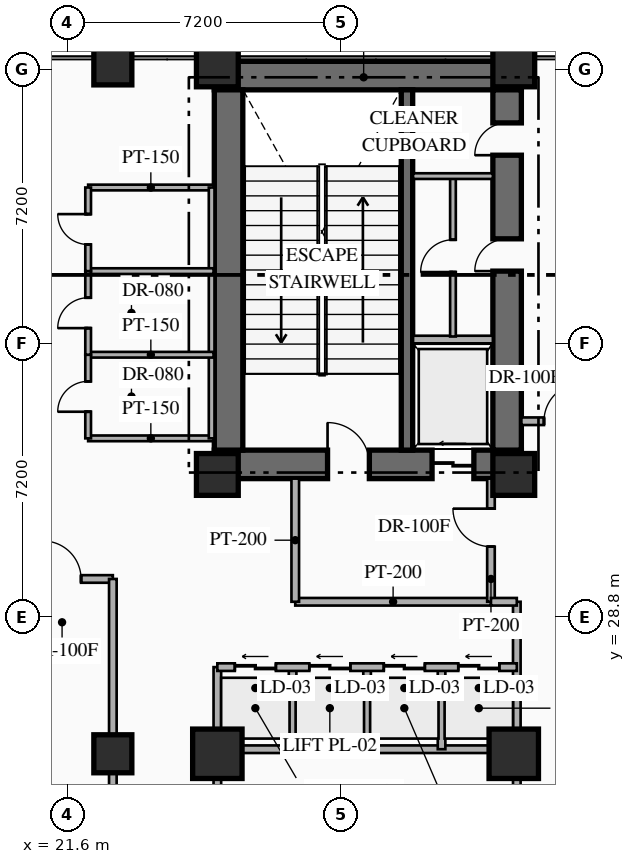
"""IFC4 building model, lengths in metres.
Left out: names, types, materials, properties, quantities, classifications, styles, units other than length and angle.
Written with IfcOpenShell. Run it as: python <this file> out.ifc"""

import sys

from ifc_helpers import new_model, si_unit, direction, frame, frame_2d, origin, origin_2d, place, context, subcontext, project, spatial, rectangle, hollow_rectangle, extrude, element, fill, save


model = new_model("IFC4")
c1 = context("Model", 3, precision=1e-05, world=origin(), true_north=direction((0.0, 1.0)))
c2 = subcontext(c1, "Body", "Model", "MODEL_VIEW")
j1 = project(units=[si_unit("LENGTHUNIT", "METRE"), si_unit("PLANEANGLEUNIT", "RADIAN")], contexts=[c1])
p1 = place(None, origin())
s1 = spatial("IfcSite", under=j1, at=p1, CompositionType="ELEMENT")
p2 = place(p1, origin())
s2 = spatial("IfcBuilding", under=s1, at=p2, CompositionType="ELEMENT")
p3 = place(p2, origin())
s3 = spatial("IfcBuildingStorey", under=s2, at=p3, CompositionType="ELEMENT", Elevation=0.0)
p4 = place(p3, frame((25.47, 32.815, 0.0), z_axis=(0.0, 0.0, 1.0), x_axis=(1.0, 0.0, 0.0)))
e1 = element("IfcWall", 1, at=p4, inside=s3, PredefinedType="SHEAR", context=c2, shape_type="SweptSolid", body=[
    extrude(rectangle(XDim=8.08, YDim=0.75, at=frame_2d((4.04, 0.0))), origin(), (0.0, 0.0, 1.0), 5.4),
])
p5 = place(p4, frame((2.98, 0.0, 0.0)))
e2 = element("IfcOpeningElement", 2, at=p5, cuts=e1, PredefinedType="OPENING", context=c2, shape_type="SweptSolid", body=[
    extrude(rectangle(XDim=1.1, YDim=2.2, at=frame_2d((0.55, 1.1))), frame((0.0, 0.385, 0.0), z_axis=(0.0, -1.0, 0.0), x_axis=(1.0, 0.0, 0.0)), (0.0, 0.0, 1.0), 0.77),
])
p6 = place(p4, frame((5.73, 0.0, 0.0)))
e3 = element("IfcOpeningElement", 3, at=p6, cuts=e1, PredefinedType="OPENING", context=c2, shape_type="SweptSolid", body=[
    extrude(rectangle(XDim=1.1, YDim=2.15, at=frame_2d((0.55, 1.075))), frame((0.0, 0.385, 0.0), z_axis=(0.0, -1.0, 0.0), x_axis=(1.0, 0.0, 0.0)), (0.0, 0.0, 1.0), 0.77),
])
p7 = place(p3, frame((25.47, 43.045, 0.0), z_axis=(0.0, 0.0, 1.0), x_axis=(1.0, 0.0, 0.0)))
e4 = element("IfcWall", 4, at=p7, inside=s3, PredefinedType="SHEAR", context=c2, shape_type="SweptSolid", body=[
    extrude(rectangle(XDim=8.08, YDim=0.75, at=frame_2d((4.04, 0.0))), origin(), (0.0, 0.0, 1.0), 5.4),
])
p8 = place(p3, frame((25.845, 33.19, 0.0), z_axis=(0.0, 0.0, 1.0), x_axis=(0.0, 1.0, 0.0)))
e5 = element("IfcWall", 5, at=p8, inside=s3, PredefinedType="SHEAR", context=c2, shape_type="SweptSolid", body=[
    extrude(rectangle(XDim=9.48, YDim=0.75, at=frame_2d((4.74, 0.0))), origin(), (0.0, 0.0, 1.0), 5.4),
])
p9 = place(p3, frame((33.175, 33.19, 0.0), z_axis=(0.0, 0.0, 1.0), x_axis=(0.0, 1.0, 0.0)))
e6 = element("IfcWall", 6, at=p9, inside=s3, PredefinedType="SHEAR", context=c2, shape_type="SweptSolid", body=[
    extrude(rectangle(XDim=9.48, YDim=0.75, at=frame_2d((4.74, 0.0))), origin(), (0.0, 0.0, 1.0), 5.4),
])
p10 = place(p9, frame((4.71, 0.0, 0.0)))
e7 = element("IfcOpeningElement", 7, at=p10, cuts=e6, PredefinedType="OPENING", context=c2, shape_type="SweptSolid", body=[
    extrude(rectangle(XDim=0.85, YDim=2.08, at=frame_2d((0.425, 1.04))), frame((0.0, 0.385, 0.0), z_axis=(0.0, -1.0, 0.0), x_axis=(1.0, 0.0, 0.0)), (0.0, 0.0, 1.0), 0.77),
])
p11 = place(p9, frame((7.76, 0.0, 0.0)))
e8 = element("IfcOpeningElement", 8, at=p11, cuts=e6, PredefinedType="OPENING", context=c2, shape_type="SweptSolid", body=[
    extrude(rectangle(XDim=0.85, YDim=2.08, at=frame_2d((0.425, 1.04))), frame((0.0, 0.385, 0.0), z_axis=(0.0, -1.0, 0.0), x_axis=(1.0, 0.0, 0.0)), (0.0, 0.0, 1.0), 0.77),
])
p12 = place(p3, frame((30.54, 33.19, 0.0), z_axis=(0.0, 0.0, 1.0), x_axis=(0.0, 1.0, 0.0)))
e9 = element("IfcWall", 9, at=p12, inside=s3, PredefinedType="SHEAR", context=c2, shape_type="SweptSolid", body=[
    extrude(rectangle(XDim=9.48, YDim=0.3, at=frame_2d((4.74, 0.0))), origin(), (0.0, 0.0, 1.0), 5.4),
])
for number, where, z_axis, x_axis in (
    (10, (25.55, 32.55, 0.0), (0.0, 0.0, 1.0), (1.0, 0.0, 0.0)),
    (11, (33.35, 32.55, 0.0), (0.0, 0.0, 1.0), (1.0, 0.0, 0.0)),
    (12, (25.55, 43.3, 0.0), (0.0, 0.0, 1.0), (1.0, 0.0, 0.0)),
    (13, (33.35, 43.3, 0.0), (0.0, 0.0, 1.0), (1.0, 0.0, 0.0)),
):
    element("IfcColumn", number, at=place(p3, frame(where, z_axis=z_axis, x_axis=x_axis)), inside=s3, PredefinedType="COLUMN", context=c2, shape_type="SweptSolid", body=[
        extrude(rectangle(XDim=1.1, YDim=1.1, at=origin_2d()), origin(), (0.0, 0.0, 1.0), 5.4),
    ])
for number, where, z_axis, x_axis in (
    (14, (25.55, 25.2, 0.0), (0.0, 0.0, 1.0), (1.0, 0.0, 0.0)),
    (15, (33.35, 25.2, 0.0), (0.0, 0.0, 1.0), (1.0, 0.0, 0.0)),
):
    element("IfcColumn", number, at=place(p3, frame(where, z_axis=z_axis, x_axis=x_axis)), inside=s3, PredefinedType="COLUMN", context=c2, shape_type="SweptSolid", body=[
        extrude(rectangle(XDim=1.3, YDim=1.3, at=origin_2d()), origin(), (0.0, 0.0, 1.0), 5.4),
    ])
for number, where, z_axis, x_axis in (
    (16, (22.8, 25.2, 0.0), (0.0, 0.0, 1.0), (1.0, 0.0, 0.0)),
    (17, (22.8, 43.3, 0.0), (0.0, 0.0, 1.0), (1.0, 0.0, 0.0)),
):
    element("IfcColumn", number, at=place(p3, frame(where, z_axis=z_axis, x_axis=x_axis)), inside=s3, PredefinedType="COLUMN", context=c2, shape_type="SweptSolid", body=[
        extrude(hollow_rectangle(XDim=1.0, YDim=1.0, WallThickness=0.038, at=origin_2d()), origin(), (0.0, 0.0, 1.0), 5.4),
    ])
p13 = place(p3, frame((30.7, 36.1, 0.0), z_axis=(0.0, 0.0, 1.0), x_axis=(1.0, 0.0, 0.0)))
e18 = element("IfcWall", 18, at=p13, inside=s3, PredefinedType="STANDARD", context=c2, shape_type="SweptSolid", body=[
    extrude(rectangle(XDim=2.1, YDim=0.2, at=frame_2d((1.05, 0.0))), origin(), (0.0, 0.0, 1.0), 5.1),
])
p14 = place(p3, frame((31.75, 36.18, 0.0), z_axis=(0.0, 0.0, 1.0), x_axis=(0.0, 1.0, 0.0)))
e19 = element("IfcWall", 19, at=p14, inside=s3, PredefinedType="PARTITIONING", context=c2, shape_type="SweptSolid", body=[
    extrude(rectangle(XDim=4.24, YDim=0.15, at=frame_2d((2.12, 0.0))), origin(), (0.0, 0.0, 1.0), 5.1),
])
p15 = place(p14, frame((1.695, 0.0, 0.0)))
e20 = element("IfcOpeningElement", 20, at=p15, cuts=e19, PredefinedType="OPENING", context=c2, shape_type="SweptSolid", body=[
    extrude(rectangle(XDim=0.85, YDim=2.08, at=frame_2d((0.425, 1.04))), frame((0.0, 0.085, 0.0), z_axis=(0.0, -1.0, 0.0), x_axis=(1.0, 0.0, 0.0)), (0.0, 0.0, 1.0), 0.17),
])
p16 = place(p3, frame((30.7, 40.4, 0.0), z_axis=(0.0, 0.0, 1.0), x_axis=(1.0, 0.0, 0.0)))
e21 = element("IfcWall", 21, at=p16, inside=s3, PredefinedType="PARTITIONING", context=c2, shape_type="SweptSolid", body=[
    extrude(rectangle(XDim=2.1, YDim=0.15, at=frame_2d((1.05, 0.0))), origin(), (0.0, 0.0, 1.0), 5.1),
])
p17 = place(p3, frame((27.6, 29.2, 0.0), z_axis=(0.0, 0.0, 1.0), x_axis=(1.0, 0.0, 0.0)))
e22 = element("IfcWall", 22, at=p17, inside=s3, PredefinedType="STANDARD", context=c2, shape_type="SweptSolid", body=[
    extrude(rectangle(XDim=5.15, YDim=0.2, at=frame_2d((2.575, 0.0))), origin(), (0.0, 0.0, 1.0), 5.1),
])
p18 = place(p3, frame((27.6, 29.2, 0.0), z_axis=(0.0, 0.0, 1.0), x_axis=(0.0, 1.0, 0.0)))
e23 = element("IfcWall", 23, at=p18, inside=s3, PredefinedType="STANDARD", context=c2, shape_type="SweptSolid", body=[
    extrude(rectangle(XDim=3.24, YDim=0.2, at=frame_2d((1.62, 0.0))), origin(), (0.0, 0.0, 1.0), 5.1),
])
p19 = place(p3, frame((32.75, 29.2, 0.0), z_axis=(0.0, 0.0, 1.0), x_axis=(0.0, 1.0, 0.0)))
e24 = element("IfcWall", 24, at=p19, inside=s3, PredefinedType="STANDARD", context=c2, shape_type="SweptSolid", body=[
    extrude(rectangle(XDim=3.24, YDim=0.2, at=frame_2d((1.62, 0.0))), origin(), (0.0, 0.0, 1.0), 5.1),
])
p20 = place(p19, frame((1.45, 0.0, 0.0)))
e25 = element("IfcOpeningElement", 25, at=p20, cuts=e24, PredefinedType="OPENING", context=c2, shape_type="SweptSolid", body=[
    extrude(rectangle(XDim=1.0, YDim=2.2, at=frame_2d((0.5, 1.1))), frame((0.0, 0.11, 0.0), z_axis=(0.0, -1.0, 0.0), x_axis=(1.0, 0.0, 0.0)), (0.0, 0.0, 1.0), 0.22),
])
p21 = place(p3, frame((25.55, 23.4, 0.0), z_axis=(0.0, 0.0, 1.0), x_axis=(0.0, 1.0, 0.0)))
e26 = element("IfcWall", 26, at=p21, inside=s3, PredefinedType="STANDARD", context=c2, shape_type="SweptSolid", body=[
    extrude(rectangle(XDim=4.08, YDim=0.2, at=frame_2d((2.04, 0.0))), origin(), (0.0, 0.0, 1.0), 3.895),
])
p22 = place(p3, frame((33.43, 23.4, 0.0), z_axis=(0.0, 0.0, 1.0), x_axis=(0.0, 1.0, 0.0)))
e27 = element("IfcWall", 27, at=p22, inside=s3, PredefinedType="STANDARD", context=c2, shape_type="SweptSolid", body=[
    extrude(rectangle(XDim=5.8, YDim=0.2, at=frame_2d((2.9, 0.0))), origin(), (0.0, 0.0, 1.0), 3.895),
])
p23 = place(p3, frame((25.55, 25.32, 0.0), z_axis=(0.0, 0.0, 1.0), x_axis=(1.0, 0.0, 0.0)))
e28 = element("IfcWall", 28, at=p23, inside=s3, PredefinedType="STANDARD", context=c2, shape_type="SweptSolid", body=[
    extrude(rectangle(XDim=7.88, YDim=0.2, at=frame_2d((3.94, 0.0))), origin(), (0.0, 0.0, 1.0), 4.495),
])
for number, where, z_axis, x_axis in (
    (29, (27.53, 25.32, 0.0), (0.0, 0.0, 1.0), (0.0, 1.0, 0.0)),
    (30, (29.49, 25.32, 0.0), (0.0, 0.0, 1.0), (0.0, 1.0, 0.0)),
    (31, (31.45, 25.32, 0.0), (0.0, 0.0, 1.0), (0.0, 1.0, 0.0)),
):
    element("IfcWall", number, at=place(p3, frame(where, z_axis=z_axis, x_axis=x_axis)), inside=s3, PredefinedType="STANDARD", context=c2, shape_type="SweptSolid", body=[
        extrude(rectangle(XDim=2.16, YDim=0.2, at=frame_2d((1.08, 0.0))), origin(), (0.0, 0.0, 1.0), 5.1),
    ])
p24 = place(p3, frame((25.55, 27.48, 0.0), z_axis=(0.0, 0.0, 1.0), x_axis=(1.0, 0.0, 0.0)))
e32 = element("IfcWall", 32, at=p24, inside=s3, PredefinedType="STANDARD", context=c2, shape_type="SweptSolid", body=[
    extrude(rectangle(XDim=7.88, YDim=0.2, at=frame_2d((3.94, 0.0))), origin(), (0.0, 0.0, 1.0), 5.1),
])
p25 = place(p24, frame((0.46, 0.0, 0.0)))
e33 = element("IfcOpeningElement", 33, at=p25, cuts=e32, PredefinedType="OPENING", context=c2, shape_type="SweptSolid", body=[
    extrude(rectangle(XDim=1.08, YDim=2.15, at=frame_2d((0.54, 1.075))), frame((0.0, 0.11, 0.0), z_axis=(0.0, -1.0, 0.0), x_axis=(1.0, 0.0, 0.0)), (0.0, 0.0, 1.0), 0.22),
])
p26 = place(p24, frame((2.42, 0.0, 0.0)))
e34 = element("IfcOpeningElement", 34, at=p26, cuts=e32, PredefinedType="OPENING", context=c2, shape_type="SweptSolid", body=[
    extrude(rectangle(XDim=1.08, YDim=2.15, at=frame_2d((0.54, 1.075))), frame((0.0, 0.11, 0.0), z_axis=(0.0, -1.0, 0.0), x_axis=(1.0, 0.0, 0.0)), (0.0, 0.0, 1.0), 0.22),
])
p27 = place(p24, frame((4.38, 0.0, 0.0)))
e35 = element("IfcOpeningElement", 35, at=p27, cuts=e32, PredefinedType="OPENING", context=c2, shape_type="SweptSolid", body=[
    extrude(rectangle(XDim=1.08, YDim=2.15, at=frame_2d((0.54, 1.075))), frame((0.0, 0.11, 0.0), z_axis=(0.0, -1.0, 0.0), x_axis=(1.0, 0.0, 0.0)), (0.0, 0.0, 1.0), 0.22),
])
p28 = place(p24, frame((6.34, 0.0, 0.0)))
e36 = element("IfcOpeningElement", 36, at=p28, cuts=e32, PredefinedType="OPENING", context=c2, shape_type="SweptSolid", body=[
    extrude(rectangle(XDim=1.08, YDim=2.15, at=frame_2d((0.54, 1.075))), frame((0.0, 0.11, 0.0), z_axis=(0.0, -1.0, 0.0), x_axis=(1.0, 0.0, 0.0)), (0.0, 0.0, 1.0), 0.22),
])
for number, where, z_axis, x_axis in (
    (37, (22.15, 33.5, 0.0), (0.0, 0.0, 1.0), (1.0, 0.0, 0.0)),
    (38, (22.15, 40.1, 0.0), (0.0, 0.0, 1.0), (1.0, 0.0, 0.0)),
):
    element("IfcWall", number, at=place(p3, frame(where, z_axis=z_axis, x_axis=x_axis)), inside=s3, PredefinedType="PARTITIONING", context=c2, shape_type="SweptSolid", body=[
        extrude(rectangle(XDim=3.3, YDim=0.15, at=frame_2d((1.65, 0.0))), origin(), (0.0, 0.0, 1.0), 5.1),
    ])
p29 = place(p3, frame((25.4, 33.5, 0.0), z_axis=(0.0, 0.0, 1.0), x_axis=(0.0, 1.0, 0.0)))
e39 = element("IfcWall", 39, at=p29, inside=s3, PredefinedType="PARTITIONING", context=c2, shape_type="SweptSolid", body=[
    extrude(rectangle(XDim=6.6, YDim=0.15, at=frame_2d((3.3, 0.0))), origin(), (0.0, 0.0, 1.0), 5.1),
])
for number, where, z_axis, x_axis in (
    (40, (22.15, 35.7, 0.0), (0.0, 0.0, 1.0), (1.0, 0.0, 0.0)),
    (41, (22.15, 37.9, 0.0), (0.0, 0.0, 1.0), (1.0, 0.0, 0.0)),
):
    element("IfcWall", number, at=place(p3, frame(where, z_axis=z_axis, x_axis=x_axis)), inside=s3, PredefinedType="PARTITIONING", context=c2, shape_type="SweptSolid", body=[
        extrude(rectangle(XDim=3.3, YDim=0.15, at=frame_2d((1.65, 0.0))), origin(), (0.0, 0.0, 1.0), 5.1),
    ])
p30 = place(p3, frame((22.15, 33.5, 0.0), z_axis=(0.0, 0.0, 1.0), x_axis=(0.0, 1.0, 0.0)))
e42 = element("IfcWall", 42, at=p30, inside=s3, PredefinedType="PARTITIONING", context=c2, shape_type="SweptSolid", body=[
    extrude(rectangle(XDim=2.2, YDim=0.15, at=frame_2d((1.1, 0.0))), origin(), (0.0, 0.0, 1.0), 5.1),
])
p31 = place(p30, frame((0.7, 0.0, 0.0)))
e43 = element("IfcOpeningElement", 43, at=p31, cuts=e42, PredefinedType="OPENING", context=c2, shape_type="SweptSolid", body=[
    extrude(rectangle(XDim=0.8, YDim=2.06, at=frame_2d((0.4, 1.03))), frame((0.0, 0.085, 0.0), z_axis=(0.0, -1.0, 0.0), x_axis=(1.0, 0.0, 0.0)), (0.0, 0.0, 1.0), 0.17),
])
p32 = place(p3, frame((22.15, 35.7, 0.0), z_axis=(0.0, 0.0, 1.0), x_axis=(0.0, 1.0, 0.0)))
e44 = element("IfcWall", 44, at=p32, inside=s3, PredefinedType="PARTITIONING", context=c2, shape_type="SweptSolid", body=[
    extrude(rectangle(XDim=2.2, YDim=0.15, at=frame_2d((1.1, 0.0))), origin(), (0.0, 0.0, 1.0), 5.1),
])
p33 = place(p32, frame((0.7, 0.0, 0.0)))
e45 = element("IfcOpeningElement", 45, at=p33, cuts=e44, PredefinedType="OPENING", context=c2, shape_type="SweptSolid", body=[
    extrude(rectangle(XDim=0.8, YDim=2.06, at=frame_2d((0.4, 1.03))), frame((0.0, 0.085, 0.0), z_axis=(0.0, -1.0, 0.0), x_axis=(1.0, 0.0, 0.0)), (0.0, 0.0, 1.0), 0.17),
])
p34 = place(p3, frame((22.15, 37.9, 0.0), z_axis=(0.0, 0.0, 1.0), x_axis=(0.0, 1.0, 0.0)))
e46 = element("IfcWall", 46, at=p34, inside=s3, PredefinedType="PARTITIONING", context=c2, shape_type="SweptSolid", body=[
    extrude(rectangle(XDim=2.2, YDim=0.15, at=frame_2d((1.1, 0.0))), origin(), (0.0, 0.0, 1.0), 5.1),
])
p35 = place(p34, frame((0.7, 0.0, 0.0)))
e47 = element("IfcOpeningElement", 47, at=p35, cuts=e46, PredefinedType="OPENING", context=c2, shape_type="SweptSolid", body=[
    extrude(rectangle(XDim=0.8, YDim=2.06, at=frame_2d((0.4, 1.03))), frame((0.0, 0.085, 0.0), z_axis=(0.0, -1.0, 0.0), x_axis=(1.0, 0.0, 0.0)), (0.0, 0.0, 1.0), 0.17),
])
p36 = place(p3, frame((18.0, 29.8, 0.0), z_axis=(0.0, 0.0, 1.0), x_axis=(1.0, 0.0, 0.0)))
e48 = element("IfcWall", 48, at=p36, inside=s3, PredefinedType="STANDARD", context=c2, shape_type="SweptSolid", body=[
    extrude(rectangle(XDim=4.8, YDim=0.2, at=frame_2d((2.4, 0.0))), origin(), (0.0, 0.0, 1.0), 5.1),
])
p37 = place(p36, frame((2.964, 0.0, 0.0)))
e49 = element("IfcOpeningElement", 49, at=p37, cuts=e48, PredefinedType="OPENING", context=c2, shape_type="SweptSolid", body=[
    extrude(rectangle(XDim=1.0, YDim=2.2, at=frame_2d((0.5, 1.1))), frame((0.0, 0.11, 0.0), z_axis=(0.0, -1.0, 0.0), x_axis=(1.0, 0.0, 0.0)), (0.0, 0.0, 1.0), 0.22),
])
p38 = place(p3, frame((22.8, 23.44, 0.0), z_axis=(0.0, 0.0, 1.0), x_axis=(0.0, 1.0, 0.0)))
e50 = element("IfcWall", 50, at=p38, inside=s3, PredefinedType="STANDARD", context=c2, shape_type="SweptSolid", body=[
    extrude(rectangle(XDim=6.36, YDim=0.2, at=frame_2d((3.18, 0.0))), origin(), (0.0, 0.0, 1.0), 3.895),
])
p39 = place(p3, frame((33.55, 33.95, 0.0), z_axis=(0.0, 0.0, 1.0), x_axis=(1.0, 0.0, 0.0)))
e51 = element("IfcWall", 51, at=p39, inside=s3, PredefinedType="STANDARD", context=c2, shape_type="SweptSolid", body=[
    extrude(rectangle(XDim=2.19, YDim=0.2, at=frame_2d((1.095, 0.0))), origin(), (0.0, 0.0, 1.0), 5.1),
])
p40 = place(p39, frame((0.595, 0.0, 0.0)))
e52 = element("IfcOpeningElement", 52, at=p40, cuts=e51, PredefinedType="OPENING", context=c2, shape_type="SweptSolid", body=[
    extrude(rectangle(XDim=1.0, YDim=2.2, at=frame_2d((0.5, 1.1))), frame((0.0, 0.11, 0.0), z_axis=(0.0, -1.0, 0.0), x_axis=(1.0, 0.0, 0.0)), (0.0, 0.0, 1.0), 0.22),
])
p41 = place(p3, frame((32.75, 29.2, 0.0), z_axis=(0.0, 0.0, 1.0), x_axis=(1.0, 0.0, 0.0)))
e53 = element("IfcWall", 53, at=p41, inside=s3, PredefinedType="STANDARD", context=c2, shape_type="SweptSolid", body=[
    extrude(rectangle(XDim=0.68, YDim=0.2, at=frame_2d((0.34, 0.0))), origin(), (0.0, 0.0, 1.0), 5.1),
])
p42 = place(p5, origin())
e54 = element("IfcDoor", 54, at=p42, inside=s3, OperationType="SINGLE_SWING_LEFT", PredefinedType="DOOR", context=c2, shape_type="SweptSolid", body=[
    extrude(rectangle(XDim=1.1, YDim=2.2, at=frame_2d((0.55, 1.1))), frame((0.0, 0.025, 0.0), z_axis=(0.0, -1.0, 0.0), x_axis=(1.0, 0.0, 0.0)), (0.0, 0.0, 1.0), 0.05),
])
fill(e2, e54)
p43 = place(p6, origin())
e55 = element("IfcDoor", 55, at=p43, inside=s3, OperationType="SLIDING_TO_LEFT", PredefinedType="USERDEFINED", context=c2, shape_type="SweptSolid", body=[
    extrude(rectangle(XDim=1.1, YDim=2.15, at=frame_2d((0.55, 1.075))), frame((0.0, 0.025, 0.0), z_axis=(0.0, -1.0, 0.0), x_axis=(1.0, 0.0, 0.0)), (0.0, 0.0, 1.0), 0.05),
])
fill(e3, e55)
p44 = place(p10, origin())
e56 = element("IfcDoor", 56, at=p44, inside=s3, OperationType="SINGLE_SWING_LEFT", PredefinedType="DOOR", context=c2, shape_type="SweptSolid", body=[
    extrude(rectangle(XDim=0.85, YDim=2.08, at=frame_2d((0.425, 1.04))), frame((0.0, 0.025, 0.0), z_axis=(0.0, -1.0, 0.0), x_axis=(1.0, 0.0, 0.0)), (0.0, 0.0, 1.0), 0.05),
])
fill(e7, e56)
p45 = place(p11, origin())
e57 = element("IfcDoor", 57, at=p45, inside=s3, OperationType="SINGLE_SWING_LEFT", PredefinedType="DOOR", context=c2, shape_type="SweptSolid", body=[
    extrude(rectangle(XDim=0.85, YDim=2.08, at=frame_2d((0.425, 1.04))), frame((0.0, 0.025, 0.0), z_axis=(0.0, -1.0, 0.0), x_axis=(1.0, 0.0, 0.0)), (0.0, 0.0, 1.0), 0.05),
])
fill(e8, e57)
p46 = place(p15, origin())
e58 = element("IfcDoor", 58, at=p46, inside=s3, OperationType="SINGLE_SWING_LEFT", PredefinedType="DOOR", context=c2, shape_type="SweptSolid", body=[
    extrude(rectangle(XDim=0.85, YDim=2.08, at=frame_2d((0.425, 1.04))), frame((0.0, 0.025, 0.0), z_axis=(0.0, -1.0, 0.0), x_axis=(1.0, 0.0, 0.0)), (0.0, 0.0, 1.0), 0.05),
])
fill(e20, e58)
p47 = place(p20, origin())
e59 = element("IfcDoor", 59, at=p47, inside=s3, OperationType="SINGLE_SWING_RIGHT", PredefinedType="DOOR", context=c2, shape_type="SweptSolid", body=[
    extrude(rectangle(XDim=1.0, YDim=2.2, at=frame_2d((0.5, 1.1))), frame((0.0, 0.025, 0.0), z_axis=(0.0, -1.0, 0.0), x_axis=(1.0, 0.0, 0.0)), (0.0, 0.0, 1.0), 0.05),
])
fill(e25, e59)
p48 = place(p25, origin())
e60 = element("IfcDoor", 60, at=p48, inside=s3, OperationType="SLIDING_TO_LEFT", PredefinedType="USERDEFINED", context=c2, shape_type="SweptSolid", body=[
    extrude(rectangle(XDim=1.08, YDim=2.15, at=frame_2d((0.54, 1.075))), frame((0.0, 0.025, 0.0), z_axis=(0.0, -1.0, 0.0), x_axis=(1.0, 0.0, 0.0)), (0.0, 0.0, 1.0), 0.05),
])
fill(e33, e60)
p49 = place(p26, origin())
e61 = element("IfcDoor", 61, at=p49, inside=s3, OperationType="SLIDING_TO_LEFT", PredefinedType="USERDEFINED", context=c2, shape_type="SweptSolid", body=[
    extrude(rectangle(XDim=1.08, YDim=2.15, at=frame_2d((0.54, 1.075))), frame((0.0, 0.025, 0.0), z_axis=(0.0, -1.0, 0.0), x_axis=(1.0, 0.0, 0.0)), (0.0, 0.0, 1.0), 0.05),
])
fill(e34, e61)
p50 = place(p27, origin())
e62 = element("IfcDoor", 62, at=p50, inside=s3, OperationType="SLIDING_TO_LEFT", PredefinedType="USERDEFINED", context=c2, shape_type="SweptSolid", body=[
    extrude(rectangle(XDim=1.08, YDim=2.15, at=frame_2d((0.54, 1.075))), frame((0.0, 0.025, 0.0), z_axis=(0.0, -1.0, 0.0), x_axis=(1.0, 0.0, 0.0)), (0.0, 0.0, 1.0), 0.05),
])
fill(e35, e62)
p51 = place(p28, origin())
e63 = element("IfcDoor", 63, at=p51, inside=s3, OperationType="SLIDING_TO_LEFT", PredefinedType="USERDEFINED", context=c2, shape_type="SweptSolid", body=[
    extrude(rectangle(XDim=1.08, YDim=2.15, at=frame_2d((0.54, 1.075))), frame((0.0, 0.025, 0.0), z_axis=(0.0, -1.0, 0.0), x_axis=(1.0, 0.0, 0.0)), (0.0, 0.0, 1.0), 0.05),
])
fill(e36, e63)
p52 = place(p31, origin())
e64 = element("IfcDoor", 64, at=p52, inside=s3, OperationType="SINGLE_SWING_LEFT", PredefinedType="DOOR", context=c2, shape_type="SweptSolid", body=[
    extrude(rectangle(XDim=0.8, YDim=2.06, at=frame_2d((0.4, 1.03))), frame((0.0, 0.025, 0.0), z_axis=(0.0, -1.0, 0.0), x_axis=(1.0, 0.0, 0.0)), (0.0, 0.0, 1.0), 0.05),
])
fill(e43, e64)
p53 = place(p33, origin())
e65 = element("IfcDoor", 65, at=p53, inside=s3, OperationType="SINGLE_SWING_LEFT", PredefinedType="DOOR", context=c2, shape_type="SweptSolid", body=[
    extrude(rectangle(XDim=0.8, YDim=2.06, at=frame_2d((0.4, 1.03))), frame((0.0, 0.025, 0.0), z_axis=(0.0, -1.0, 0.0), x_axis=(1.0, 0.0, 0.0)), (0.0, 0.0, 1.0), 0.05),
])
fill(e45, e65)
p54 = place(p35, origin())
e66 = element("IfcDoor", 66, at=p54, inside=s3, OperationType="SINGLE_SWING_RIGHT", PredefinedType="DOOR", context=c2, shape_type="SweptSolid", body=[
    extrude(rectangle(XDim=0.8, YDim=2.06, at=frame_2d((0.4, 1.03))), frame((0.0, 0.025, 0.0), z_axis=(0.0, -1.0, 0.0), x_axis=(1.0, 0.0, 0.0)), (0.0, 0.0, 1.0), 0.05),
])
fill(e47, e66)
p55 = place(p37, origin())
e67 = element("IfcDoor", 67, at=p55, inside=s3, OperationType="SINGLE_SWING_LEFT", PredefinedType="DOOR", context=c2, shape_type="SweptSolid", body=[
    extrude(rectangle(XDim=1.0, YDim=2.2, at=frame_2d((0.5, 1.1))), frame((0.0, 0.025, 0.0), z_axis=(0.0, -1.0, 0.0), x_axis=(1.0, 0.0, 0.0)), (0.0, 0.0, 1.0), 0.05),
])
fill(e49, e67)
p56 = place(p40, origin())
e68 = element("IfcDoor", 68, at=p56, inside=s3, OperationType="SINGLE_SWING_RIGHT", PredefinedType="DOOR", context=c2, shape_type="SweptSolid", body=[
    extrude(rectangle(XDim=1.0, YDim=2.2, at=frame_2d((0.5, 1.1))), frame((0.0, 0.025, 0.0), z_axis=(0.0, -1.0, 0.0), x_axis=(1.0, 0.0, 0.0)), (0.0, 0.0, 1.0), 0.05),
])
fill(e52, e68)
save(model, sys.argv[1])
